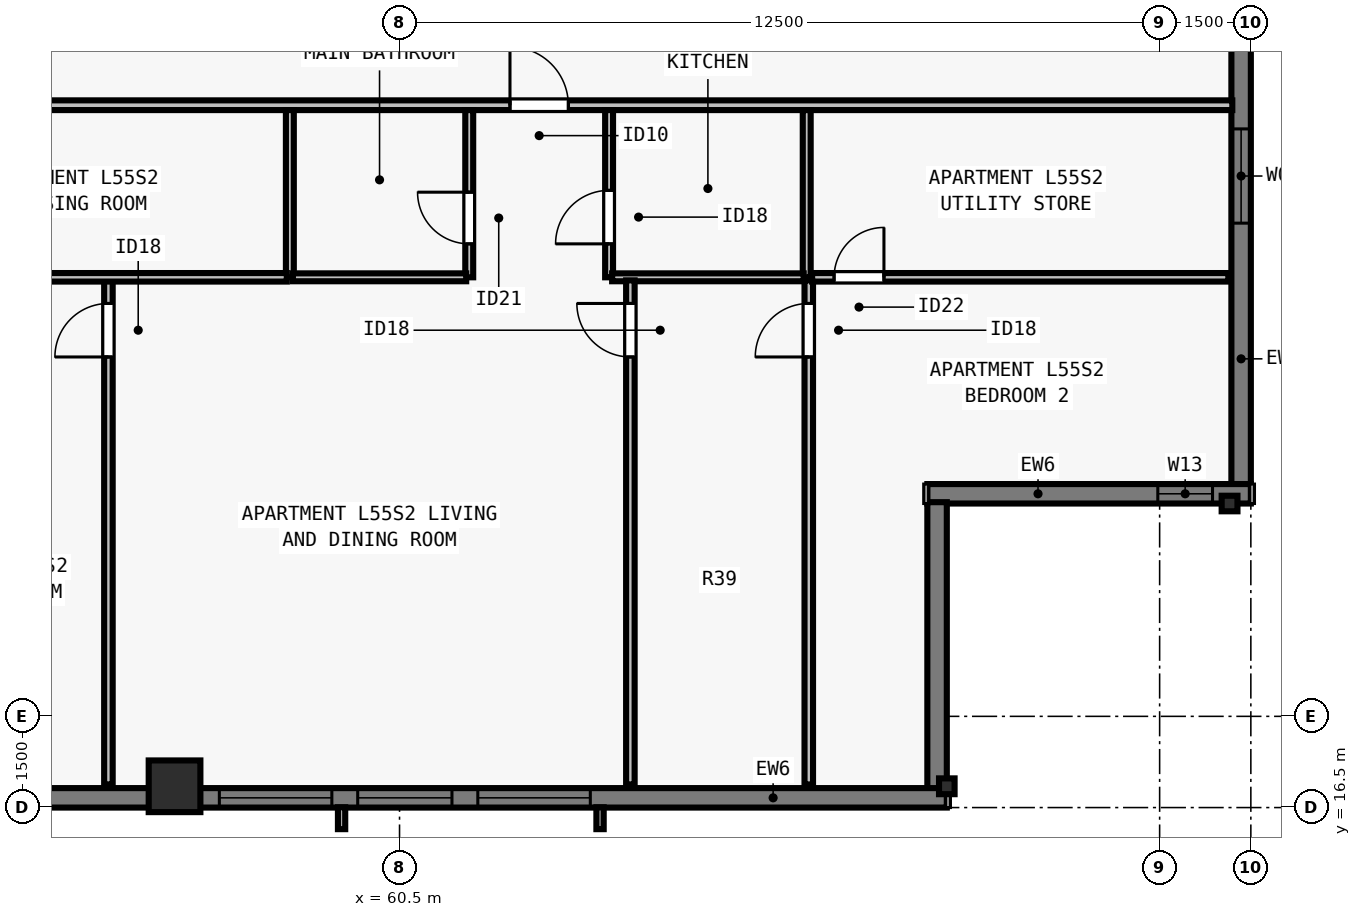
"""IFC4 building model, lengths in metres.
Left out: names, types, materials, properties, quantities, classifications, styles, units other than length and angle.
Written with IfcOpenShell. Run it as: python <this file> out.ifc"""

import sys

from ifc_helpers import new_model, si_unit, direction, frame, frame_2d, origin, origin_2d, place, context, subcontext, project, spatial, rectangle, i_section, extrude, element, fill, save


model = new_model("IFC4")
c1 = context("Model", 3, precision=1e-05, world=origin(), true_north=direction((0.0, 1.0)))
c2 = subcontext(c1, "Body", "Model", "MODEL_VIEW")
j1 = project(units=[si_unit("LENGTHUNIT", "METRE"), si_unit("PLANEANGLEUNIT", "RADIAN")], contexts=[c1])
p1 = place(None, origin())
s1 = spatial("IfcSite", under=j1, at=p1, CompositionType="ELEMENT")
p2 = place(p1, origin())
s2 = spatial("IfcBuilding", under=s1, at=p2, CompositionType="ELEMENT")
p3 = place(p2, frame((0.0, 0.0, 202.5)))
s3 = spatial("IfcBuildingStorey", under=s2, at=p3, CompositionType="ELEMENT", Elevation=202.5)
p4 = place(p3, frame((56.8, 16.85, 0.0), z_axis=(0.0, 0.0, 1.0), x_axis=(1.0, 0.0, 0.0)))
e1 = element("IfcColumn", 1, at=p4, inside=s3, PredefinedType="COLUMN", context=c2, shape_type="SweptSolid", body=[
    extrude(rectangle(XDim=0.85, YDim=0.85, at=origin_2d()), origin(), (0.0, 0.0, 1.0), 3.5),
])
for number, where, z_axis, x_axis in (
    (2, (69.5, 16.85, 0.0), (0.0, 0.0, 1.0), (1.0, 0.0, 0.0)),
    (3, (74.15, 21.5, 0.0), (0.0, 0.0, 1.0), (0.0, 1.0, 0.0)),
):
    element("IfcColumn", number, at=place(p3, frame(where, z_axis=z_axis, x_axis=x_axis)), inside=s3, PredefinedType="COLUMN", context=c2, shape_type="SweptSolid", body=[
        extrude(i_section(OverallWidth=0.256, OverallDepth=0.26, WebThickness=0.01, FlangeThickness=0.017, FilletRadius=0.013, at=origin_2d()), origin(), (0.0, 0.0, 1.0), 3.5),
    ])
p5 = place(p3, frame((74.34, 56.5, 0.0), z_axis=(0.0, 0.0, 1.0), x_axis=(0.0, -1.0, 0.0)))
e4 = element("IfcWall", 4, at=p5, inside=s3, PredefinedType="SOLIDWALL", context=c2, shape_type="SweptSolid", body=[
    extrude(rectangle(XDim=34.702, YDim=0.32, at=frame_2d((17.351, 0.0))), origin(), (0.0, 0.0, 1.0), 3.29),
])
p6 = place(p5, frame((4.163, 0.0, 0.8)))
e5 = element("IfcOpeningElement", 5, at=p6, cuts=e4, PredefinedType="OPENING", context=c2, shape_type="SweptSolid", body=[
    extrude(rectangle(XDim=1.85, YDim=1.678, at=frame_2d((0.925, 0.839))), frame((0.0, 0.17, 0.0), z_axis=(0.0, -1.0, 0.0), x_axis=(1.0, 0.0, 0.0)), (0.0, 0.0, 1.0), 0.34),
])
p7 = place(p5, frame((6.888, 0.0, 0.8)))
e6 = element("IfcOpeningElement", 6, at=p7, cuts=e4, PredefinedType="OPENING", context=c2, shape_type="SweptSolid", body=[
    extrude(rectangle(XDim=1.55, YDim=1.678, at=frame_2d((0.775, 0.839))), frame((0.0, 0.17, 0.0), z_axis=(0.0, -1.0, 0.0), x_axis=(1.0, 0.0, 0.0)), (0.0, 0.0, 1.0), 0.34),
])
p8 = place(p5, frame((10.113, 0.0, 0.8)))
e7 = element("IfcOpeningElement", 7, at=p8, cuts=e4, PredefinedType="OPENING", context=c2, shape_type="SweptSolid", body=[
    extrude(rectangle(XDim=1.85, YDim=1.678, at=frame_2d((0.925, 0.839))), frame((0.0, 0.17, 0.0), z_axis=(0.0, -1.0, 0.0), x_axis=(1.0, 0.0, 0.0)), (0.0, 0.0, 1.0), 0.34),
])
p9 = place(p5, frame((14.888, 0.0, 0.8)))
e8 = element("IfcOpeningElement", 8, at=p9, cuts=e4, PredefinedType="OPENING", context=c2, shape_type="SweptSolid", body=[
    extrude(rectangle(XDim=1.55, YDim=1.678, at=frame_2d((0.775, 0.839))), frame((0.0, 0.17, 0.0), z_axis=(0.0, -1.0, 0.0), x_axis=(1.0, 0.0, 0.0)), (0.0, 0.0, 1.0), 0.34),
])
p10 = place(p5, frame((18.114, 0.0, 0.8)))
e9 = element("IfcOpeningElement", 9, at=p10, cuts=e4, PredefinedType="OPENING", context=c2, shape_type="SweptSolid", body=[
    extrude(rectangle(XDim=1.85, YDim=1.678, at=frame_2d((0.925, 0.839))), frame((0.0, 0.17, 0.0), z_axis=(0.0, -1.0, 0.0), x_axis=(1.0, 0.0, 0.0)), (0.0, 0.0, 1.0), 0.34),
])
p11 = place(p5, frame((23.614, 0.0, 0.8)))
e10 = element("IfcOpeningElement", 10, at=p11, cuts=e4, PredefinedType="OPENING", context=c2, shape_type="SweptSolid", body=[
    extrude(rectangle(XDim=1.85, YDim=1.678, at=frame_2d((0.925, 0.839))), frame((0.0, 0.17, 0.0), z_axis=(0.0, -1.0, 0.0), x_axis=(1.0, 0.0, 0.0)), (0.0, 0.0, 1.0), 0.34),
])
p12 = place(p5, frame((28.839, 0.0, 0.8)))
e11 = element("IfcOpeningElement", 11, at=p12, cuts=e4, PredefinedType="OPENING", context=c2, shape_type="SweptSolid", body=[
    extrude(rectangle(XDim=1.55, YDim=1.678, at=frame_2d((0.775, 0.839))), frame((0.0, 0.17, 0.0), z_axis=(0.0, -1.0, 0.0), x_axis=(1.0, 0.0, 0.0)), (0.0, 0.0, 1.0), 0.34),
])
p13 = place(p3, frame((74.5, 21.66, 0.0), z_axis=(0.0, 0.0, 1.0), x_axis=(-1.0, 0.0, 0.0)))
e12 = element("IfcWall", 12, at=p13, inside=s3, PredefinedType="SOLIDWALL", context=c2, shape_type="SweptSolid", body=[
    extrude(rectangle(XDim=5.32, YDim=0.32, at=frame_2d((2.66, 0.0))), origin(), (0.0, 0.0, 1.0), 3.29),
])
p14 = place(p13, frame((0.63, 0.0, 0.8)))
e13 = element("IfcOpeningElement", 13, at=p14, cuts=e12, PredefinedType="OPENING", context=c2, shape_type="SweptSolid", body=[
    extrude(rectangle(XDim=0.9, YDim=1.678, at=frame_2d((0.45, 0.839))), frame((0.0, 0.17, 0.0), z_axis=(0.0, -1.0, 0.0), x_axis=(1.0, 0.0, 0.0)), (0.0, 0.0, 1.0), 0.34),
])
p15 = place(p3, frame((69.34, 21.522, 0.0), z_axis=(0.0, 0.0, 1.0), x_axis=(0.0, -1.0, 0.0)))
e14 = element("IfcWall", 14, at=p15, inside=s3, PredefinedType="SOLIDWALL", context=c2, shape_type="SweptSolid", body=[
    extrude(rectangle(XDim=4.724, YDim=0.32, at=frame_2d((2.362, 0.0))), origin(), (0.0, 0.0, 1.0), 3.29),
])
p16 = place(p3, frame((69.5, 16.66, 0.0), z_axis=(0.0, 0.0, 1.0), x_axis=(-1.0, 0.0, 0.0)))
e15 = element("IfcWall", 15, at=p16, inside=s3, PredefinedType="SOLIDWALL", context=c2, shape_type="SweptSolid", body=[
    extrude(rectangle(XDim=34.702, YDim=0.32, at=frame_2d((17.351, 0.0))), origin(), (0.0, 0.0, 1.0), 3.29),
])
p17 = place(p16, frame((5.863, 0.0, 0.8)))
e16 = element("IfcOpeningElement", 16, at=p17, cuts=e15, PredefinedType="OPENING", context=c2, shape_type="SweptSolid", body=[
    extrude(rectangle(XDim=1.85, YDim=1.678, at=frame_2d((0.925, 0.839))), frame((0.0, 0.17, 0.0), z_axis=(0.0, -1.0, 0.0), x_axis=(1.0, 0.0, 0.0)), (0.0, 0.0, 1.0), 0.34),
])
p18 = place(p16, frame((8.138, 0.0, 0.8)))
e17 = element("IfcOpeningElement", 17, at=p18, cuts=e15, PredefinedType="OPENING", context=c2, shape_type="SweptSolid", body=[
    extrude(rectangle(XDim=1.55, YDim=1.678, at=frame_2d((0.775, 0.839))), frame((0.0, 0.17, 0.0), z_axis=(0.0, -1.0, 0.0), x_axis=(1.0, 0.0, 0.0)), (0.0, 0.0, 1.0), 0.34),
])
p19 = place(p16, frame((10.113, 0.0, 0.8)))
e18 = element("IfcOpeningElement", 18, at=p19, cuts=e15, PredefinedType="OPENING", context=c2, shape_type="SweptSolid", body=[
    extrude(rectangle(XDim=1.85, YDim=1.678, at=frame_2d((0.925, 0.839))), frame((0.0, 0.17, 0.0), z_axis=(0.0, -1.0, 0.0), x_axis=(1.0, 0.0, 0.0)), (0.0, 0.0, 1.0), 0.34),
])
p20 = place(p16, frame((14.888, 0.0, 0.8)))
e19 = element("IfcOpeningElement", 19, at=p20, cuts=e15, PredefinedType="OPENING", context=c2, shape_type="SweptSolid", body=[
    extrude(rectangle(XDim=1.55, YDim=1.678, at=frame_2d((0.775, 0.839))), frame((0.0, 0.17, 0.0), z_axis=(0.0, -1.0, 0.0), x_axis=(1.0, 0.0, 0.0)), (0.0, 0.0, 1.0), 0.34),
])
p21 = place(p16, frame((18.564, 0.0, 0.8)))
e20 = element("IfcOpeningElement", 20, at=p21, cuts=e15, PredefinedType="OPENING", context=c2, shape_type="SweptSolid", body=[
    extrude(rectangle(XDim=1.85, YDim=1.678, at=frame_2d((0.925, 0.839))), frame((0.0, 0.17, 0.0), z_axis=(0.0, -1.0, 0.0), x_axis=(1.0, 0.0, 0.0)), (0.0, 0.0, 1.0), 0.34),
])
p22 = place(p16, frame((24.414, 0.0, 0.8)))
e21 = element("IfcOpeningElement", 21, at=p22, cuts=e15, PredefinedType="OPENING", context=c2, shape_type="SweptSolid", body=[
    extrude(rectangle(XDim=1.85, YDim=1.678, at=frame_2d((0.925, 0.839))), frame((0.0, 0.17, 0.0), z_axis=(0.0, -1.0, 0.0), x_axis=(1.0, 0.0, 0.0)), (0.0, 0.0, 1.0), 0.34),
])
p23 = place(p16, frame((28.389, 0.0, 0.8)))
e22 = element("IfcOpeningElement", 22, at=p23, cuts=e15, PredefinedType="OPENING", context=c2, shape_type="SweptSolid", body=[
    extrude(rectangle(XDim=1.55, YDim=1.678, at=frame_2d((0.775, 0.839))), frame((0.0, 0.17, 0.0), z_axis=(0.0, -1.0, 0.0), x_axis=(1.0, 0.0, 0.0)), (0.0, 0.0, 1.0), 0.34),
])
p24 = place(p3, frame((29.805, 28.05, 0.0), z_axis=(0.0, 0.0, 1.0), x_axis=(1.0, 0.0, 0.0)))
e23 = element("IfcWall", 23, at=p24, inside=s3, PredefinedType="PARTITIONING", context=c2, shape_type="SweptSolid", body=[
    extrude(rectangle(XDim=44.39, YDim=0.16, at=frame_2d((22.195, 0.0))), origin(), (0.0, 0.0, 1.0), 2.958),
])
p25 = place(p24, frame((10.431, 0.0, 0.0)))
e24 = element("IfcOpeningElement", 24, at=p25, cuts=e23, PredefinedType="OPENING", context=c2, shape_type="SweptSolid", body=[
    extrude(rectangle(XDim=0.96, YDim=2.18, at=frame_2d((0.48, 1.09))), frame((0.0, 0.09, 0.0), z_axis=(0.0, -1.0, 0.0), x_axis=(1.0, 0.0, 0.0)), (0.0, 0.0, 1.0), 0.18),
])
p26 = place(p24, frame((32.511, 0.0, 0.0)))
e25 = element("IfcOpeningElement", 25, at=p26, cuts=e23, PredefinedType="OPENING", context=c2, shape_type="SweptSolid", body=[
    extrude(rectangle(XDim=0.96, YDim=2.18, at=frame_2d((0.48, 1.09))), frame((0.0, 0.09, 0.0), z_axis=(0.0, -1.0, 0.0), x_axis=(1.0, 0.0, 0.0)), (0.0, 0.0, 1.0), 0.18),
])
p27 = place(p3, frame((58.696, 25.22, 0.0), z_axis=(0.0, 0.0, 1.0), x_axis=(0.0, 1.0, 0.0)))
e26 = element("IfcWall", 26, at=p27, inside=s3, PredefinedType="PLUMBINGWALL", context=c2, shape_type="SweptSolid", body=[
    extrude(rectangle(XDim=2.75, YDim=0.13, at=frame_2d((1.375, 0.0))), origin(), (0.0, 0.0, 1.0), 3.29),
])
p28 = place(p3, frame((61.646, 25.22, 0.0), z_axis=(0.0, 0.0, 1.0), x_axis=(0.0, 1.0, 0.0)))
e27 = element("IfcWall", 27, at=p28, inside=s3, PredefinedType="PLUMBINGWALL", context=c2, shape_type="SweptSolid", body=[
    extrude(rectangle(XDim=2.75, YDim=0.13, at=frame_2d((1.375, 0.0))), origin(), (0.0, 0.0, 1.0), 3.29),
])
p29 = place(p28, frame((0.55, 0.0, 0.0)))
e28 = element("IfcOpeningElement", 28, at=p29, cuts=e27, PredefinedType="OPENING", context=c2, shape_type="SweptSolid", body=[
    extrude(rectangle(XDim=0.85, YDim=2.08, at=frame_2d((0.425, 1.04))), frame((0.0, 0.075, 0.0), z_axis=(0.0, -1.0, 0.0), x_axis=(1.0, 0.0, 0.0)), (0.0, 0.0, 1.0), 0.15),
])
p30 = place(p3, frame((58.746, 25.22, 0.0), z_axis=(0.0, 0.0, 1.0), x_axis=(1.0, 0.0, 0.0)))
e29 = element("IfcWall", 29, at=p30, inside=s3, PredefinedType="PLUMBINGWALL", context=c2, shape_type="SweptSolid", body=[
    extrude(rectangle(XDim=2.85, YDim=0.13, at=frame_2d((1.425, 0.0))), origin(), (0.0, 0.0, 1.0), 3.29),
])
p31 = place(p3, frame((67.196, 25.22, 0.0), z_axis=(0.0, 0.0, 1.0), x_axis=(0.0, 1.0, 0.0)))
e30 = element("IfcWall", 30, at=p31, inside=s3, PredefinedType="PLUMBINGWALL", context=c2, shape_type="SweptSolid", body=[
    extrude(rectangle(XDim=2.75, YDim=0.13, at=frame_2d((1.375, 0.0))), origin(), (0.0, 0.0, 1.0), 3.29),
])
p32 = place(p3, frame((63.946, 25.22, 0.0), z_axis=(0.0, 0.0, 1.0), x_axis=(0.0, 1.0, 0.0)))
e31 = element("IfcWall", 31, at=p32, inside=s3, PredefinedType="PLUMBINGWALL", context=c2, shape_type="SweptSolid", body=[
    extrude(rectangle(XDim=2.75, YDim=0.13, at=frame_2d((1.375, 0.0))), origin(), (0.0, 0.0, 1.0), 2.573),
])
p33 = place(p32, frame((0.55, 0.0, 0.0)))
e32 = element("IfcOpeningElement", 32, at=p33, cuts=e31, PredefinedType="OPENING", context=c2, shape_type="SweptSolid", body=[
    extrude(rectangle(XDim=0.88, YDim=2.1, at=frame_2d((0.44, 1.05))), frame((0.0, 0.075, 0.0), z_axis=(0.0, -1.0, 0.0), x_axis=(1.0, 0.0, 0.0)), (0.0, 0.0, 1.0), 0.15),
])
p34 = place(p3, frame((63.996, 25.22, 0.0), z_axis=(0.0, 0.0, 1.0), x_axis=(1.0, 0.0, 0.0)))
e33 = element("IfcWall", 33, at=p34, inside=s3, PredefinedType="PLUMBINGWALL", context=c2, shape_type="SweptSolid", body=[
    extrude(rectangle(XDim=3.15, YDim=0.13, at=frame_2d((1.575, 0.0))), origin(), (0.0, 0.0, 1.0), 3.29),
])
p35 = place(p3, frame((55.712, 16.88, 0.0), z_axis=(0.0, 0.0, 1.0), x_axis=(0.0, 1.0, 0.0)))
e34 = element("IfcWall", 34, at=p35, inside=s3, PredefinedType="PARTITIONING", context=c2, shape_type="SweptSolid", body=[
    extrude(rectangle(XDim=8.38, YDim=0.14, at=frame_2d((4.19, 0.0))), origin(), (0.0, 0.0, 1.0), 3.29),
])
p36 = place(p35, frame((7.03, 0.0, 0.0)))
e35 = element("IfcOpeningElement", 35, at=p36, cuts=e34, PredefinedType="OPENING", context=c2, shape_type="SweptSolid", body=[
    extrude(rectangle(XDim=0.88, YDim=2.1, at=frame_2d((0.44, 1.05))), frame((0.0, 0.08, 0.0), z_axis=(0.0, -1.0, 0.0), x_axis=(1.0, 0.0, 0.0)), (0.0, 0.0, 1.0), 0.16),
])
p37 = place(p3, frame((51.577, 25.22, 0.0), z_axis=(0.0, 0.0, 1.0), x_axis=(1.0, 0.0, 0.0)))
e36 = element("IfcWall", 36, at=p37, inside=s3, PredefinedType="PARTITIONING", context=c2, shape_type="SweptSolid", body=[
    extrude(rectangle(XDim=7.069, YDim=0.14, at=frame_2d((3.534, 0.0))), origin(), (0.0, 0.0, 1.0), 3.29),
])
p38 = place(p37, frame((0.335, 0.0, 0.0)))
e37 = element("IfcOpeningElement", 37, at=p38, cuts=e36, PredefinedType="OPENING", context=c2, shape_type="SweptSolid", body=[
    extrude(rectangle(XDim=0.82, YDim=2.1, at=frame_2d((0.41, 1.05))), frame((0.0, 0.08, 0.0), z_axis=(0.0, -1.0, 0.0), x_axis=(1.0, 0.0, 0.0)), (0.0, 0.0, 1.0), 0.16),
])
p39 = place(p3, frame((67.23, 16.88, 0.0), z_axis=(0.0, 0.0, 1.0), x_axis=(0.0, 1.0, 0.0)))
e38 = element("IfcWall", 38, at=p39, inside=s3, PredefinedType="PARTITIONING", context=c2, shape_type="SweptSolid", body=[
    extrude(rectangle(XDim=8.29, YDim=0.14, at=frame_2d((4.145, 0.0))), origin(), (0.0, 0.0, 1.0), 2.573),
])
p40 = place(p39, frame((7.03, 0.0, 0.0)))
e39 = element("IfcOpeningElement", 39, at=p40, cuts=e38, PredefinedType="OPENING", context=c2, shape_type="SweptSolid", body=[
    extrude(rectangle(XDim=0.88, YDim=2.1, at=frame_2d((0.44, 1.05))), frame((0.0, 0.08, 0.0), z_axis=(0.0, -1.0, 0.0), x_axis=(1.0, 0.0, 0.0)), (0.0, 0.0, 1.0), 0.16),
])
p41 = place(p3, frame((67.285, 25.22, 0.0), z_axis=(0.0, 0.0, 1.0), x_axis=(1.0, 0.0, 0.0)))
e40 = element("IfcWall", 40, at=p41, inside=s3, PredefinedType="PARTITIONING", context=c2, shape_type="SweptSolid", body=[
    extrude(rectangle(XDim=6.845, YDim=0.14, at=frame_2d((3.422, 0.0))), origin(), (0.0, 0.0, 1.0), 2.958),
])
p42 = place(p41, frame((0.361, 0.0, 0.0)))
e41 = element("IfcOpeningElement", 41, at=p42, cuts=e40, PredefinedType="OPENING", context=c2, shape_type="SweptSolid", body=[
    extrude(rectangle(XDim=0.82, YDim=2.1, at=frame_2d((0.41, 1.05))), frame((0.0, 0.08, 0.0), z_axis=(0.0, -1.0, 0.0), x_axis=(1.0, 0.0, 0.0)), (0.0, 0.0, 1.0), 0.16),
])
p43 = place(p3, frame((64.296, 16.88, 0.0), z_axis=(0.0, 0.0, 1.0), x_axis=(0.0, 1.0, 0.0)))
e42 = element("IfcWall", 42, at=p43, inside=s3, PredefinedType="PARTITIONING", context=c2, shape_type="SweptSolid", body=[
    extrude(rectangle(XDim=8.29, YDim=0.14, at=frame_2d((4.145, 0.0))), origin(), (0.0, 0.0, 1.0), 2.573),
])
p44 = place(p43, frame((7.03, 0.0, 0.0)))
e43 = element("IfcOpeningElement", 43, at=p44, cuts=e42, PredefinedType="OPENING", context=c2, shape_type="SweptSolid", body=[
    extrude(rectangle(XDim=0.88, YDim=2.1, at=frame_2d((0.44, 1.05))), frame((0.0, 0.08, 0.0), z_axis=(0.0, -1.0, 0.0), x_axis=(1.0, 0.0, 0.0)), (0.0, 0.0, 1.0), 0.16),
])
p45 = place(p12, origin())
e44 = element("IfcWindow", 44, at=p45, inside=s3, PartitioningType="SINGLE_PANEL", PredefinedType="WINDOW", context=c2, shape_type="SweptSolid", body=[
    extrude(rectangle(XDim=1.55, YDim=1.678, at=frame_2d((0.775, 0.839))), frame((0.0, -0.05, 0.0), z_axis=(0.0, -1.0, 0.0), x_axis=(1.0, 0.0, 0.0)), (0.0, 0.0, 1.0), 0.06),
])
fill(e11, e44)
p46 = place(p17, origin())
e45 = element("IfcWindow", 45, at=p46, inside=s3, PartitioningType="SINGLE_PANEL", PredefinedType="WINDOW", context=c2, shape_type="SweptSolid", body=[
    extrude(rectangle(XDim=1.85, YDim=1.678, at=frame_2d((0.925, 0.839))), frame((0.0, -0.05, 0.0), z_axis=(0.0, -1.0, 0.0), x_axis=(1.0, 0.0, 0.0)), (0.0, 0.0, 1.0), 0.06),
])
fill(e16, e45)
p47 = place(p18, origin())
e46 = element("IfcWindow", 46, at=p47, inside=s3, PartitioningType="SINGLE_PANEL", PredefinedType="WINDOW", context=c2, shape_type="SweptSolid", body=[
    extrude(rectangle(XDim=1.55, YDim=1.678, at=frame_2d((0.775, 0.839))), frame((0.0, -0.05, 0.0), z_axis=(0.0, -1.0, 0.0), x_axis=(1.0, 0.0, 0.0)), (0.0, 0.0, 1.0), 0.06),
])
fill(e17, e46)
p48 = place(p19, origin())
e47 = element("IfcWindow", 47, at=p48, inside=s3, PartitioningType="SINGLE_PANEL", PredefinedType="WINDOW", context=c2, shape_type="SweptSolid", body=[
    extrude(rectangle(XDim=1.85, YDim=1.678, at=frame_2d((0.925, 0.839))), frame((0.0, -0.05, 0.0), z_axis=(0.0, -1.0, 0.0), x_axis=(1.0, 0.0, 0.0)), (0.0, 0.0, 1.0), 0.06),
])
fill(e18, e47)
p49 = place(p14, origin())
e48 = element("IfcWindow", 48, at=p49, inside=s3, PartitioningType="SINGLE_PANEL", PredefinedType="WINDOW", context=c2, shape_type="SweptSolid", body=[
    extrude(rectangle(XDim=0.9, YDim=1.678, at=frame_2d((0.45, 0.839))), frame((0.0, -0.04, 0.0), z_axis=(0.0, -1.0, 0.0), x_axis=(1.0, 0.0, 0.0)), (0.0, 0.0, 1.0), 0.06),
])
fill(e13, e48)
p50 = place(p29, origin())
e49 = element("IfcDoor", 49, at=p50, inside=s3, OperationType="SINGLE_SWING_RIGHT", PredefinedType="DOOR", context=c2, shape_type="SweptSolid", body=[
    extrude(rectangle(XDim=0.85, YDim=2.08, at=frame_2d((0.425, 1.04))), frame((0.0, 0.025, 0.0), z_axis=(0.0, -1.0, 0.0), x_axis=(1.0, 0.0, 0.0)), (0.0, 0.0, 1.0), 0.05),
])
fill(e28, e49)
p51 = place(p33, origin())
e50 = element("IfcDoor", 50, at=p51, inside=s3, OperationType="SINGLE_SWING_LEFT", PredefinedType="DOOR", context=c2, shape_type="SweptSolid", body=[
    extrude(rectangle(XDim=0.88, YDim=2.1, at=frame_2d((0.44, 1.05))), frame((0.0, 0.025, 0.0), z_axis=(0.0, -1.0, 0.0), x_axis=(1.0, 0.0, 0.0)), (0.0, 0.0, 1.0), 0.05),
])
fill(e32, e50)
p52 = place(p36, origin())
e51 = element("IfcDoor", 51, at=p52, inside=s3, OperationType="SINGLE_SWING_LEFT", PredefinedType="DOOR", context=c2, shape_type="SweptSolid", body=[
    extrude(rectangle(XDim=0.88, YDim=2.1, at=frame_2d((0.44, 1.05))), frame((0.0, 0.025, 0.0), z_axis=(0.0, -1.0, 0.0), x_axis=(1.0, 0.0, 0.0)), (0.0, 0.0, 1.0), 0.05),
])
fill(e35, e51)
p53 = place(p42, origin())
e52 = element("IfcDoor", 52, at=p53, inside=s3, OperationType="SINGLE_SWING_RIGHT", PredefinedType="DOOR", context=c2, shape_type="SweptSolid", body=[
    extrude(rectangle(XDim=0.82, YDim=2.1, at=frame_2d((0.41, 1.05))), frame((0.0, 0.025, 0.0), z_axis=(0.0, -1.0, 0.0), x_axis=(1.0, 0.0, 0.0)), (0.0, 0.0, 1.0), 0.05),
])
fill(e41, e52)
p54 = place(p40, origin())
e53 = element("IfcDoor", 53, at=p54, inside=s3, OperationType="SINGLE_SWING_LEFT", PredefinedType="DOOR", context=c2, shape_type="SweptSolid", body=[
    extrude(rectangle(XDim=0.88, YDim=2.1, at=frame_2d((0.44, 1.05))), frame((0.0, 0.025, 0.0), z_axis=(0.0, -1.0, 0.0), x_axis=(1.0, 0.0, 0.0)), (0.0, 0.0, 1.0), 0.05),
])
fill(e39, e53)
p55 = place(p44, origin())
e54 = element("IfcDoor", 54, at=p55, inside=s3, OperationType="SINGLE_SWING_RIGHT", PredefinedType="DOOR", context=c2, shape_type="SweptSolid", body=[
    extrude(rectangle(XDim=0.88, YDim=2.1, at=frame_2d((0.44, 1.05))), frame((0.0, 0.025, 0.0), z_axis=(0.0, -1.0, 0.0), x_axis=(1.0, 0.0, 0.0)), (0.0, 0.0, 1.0), 0.05),
])
fill(e43, e54)
p56 = place(p26, origin())
e55 = element("IfcDoor", 55, at=p56, inside=s3, OperationType="SINGLE_SWING_LEFT", PredefinedType="DOOR", context=c2, shape_type="SweptSolid", body=[
    extrude(rectangle(XDim=0.96, YDim=2.18, at=frame_2d((0.48, 1.09))), frame((0.0, 0.025, 0.0), z_axis=(0.0, -1.0, 0.0), x_axis=(1.0, 0.0, 0.0)), (0.0, 0.0, 1.0), 0.05),
])
fill(e25, e55)
save(model, sys.argv[1])
